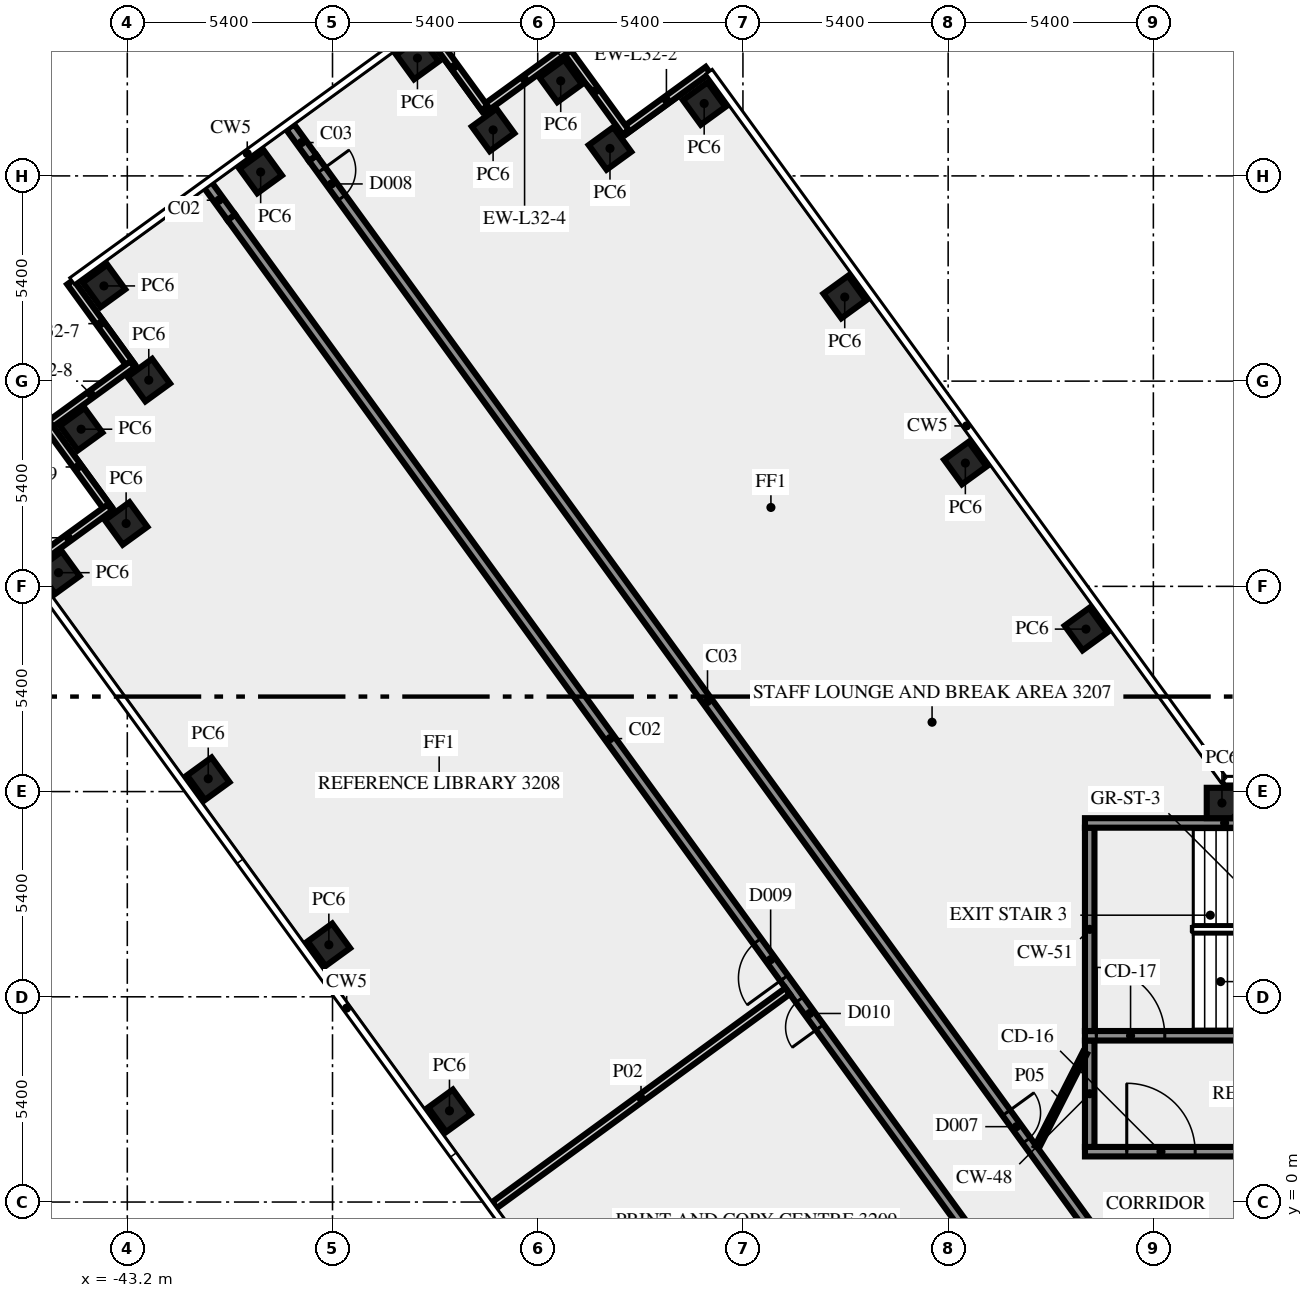
"""IFC4 building model, lengths in metres.
Left out: names, types, materials, properties, quantities, classifications, styles, units other than length and angle.
Written with IfcOpenShell. Run it as: python <this file> out.ifc"""

import sys

from ifc_helpers import new_model, si_unit, direction, frame, frame_2d, origin, origin_2d, place, context, subcontext, project, spatial, rectangle, extrude, element, fill, save


model = new_model("IFC4")
c1 = context("Model", 3, precision=1e-05, world=origin(), true_north=direction((0.0, 1.0)))
c2 = subcontext(c1, "Body", "Model", "MODEL_VIEW")
j1 = project(units=[si_unit("LENGTHUNIT", "METRE"), si_unit("PLANEANGLEUNIT", "RADIAN")], contexts=[c1])
p1 = place(None, origin())
s1 = spatial("IfcSite", under=j1, at=p1, CompositionType="ELEMENT")
p2 = place(p1, origin())
s2 = spatial("IfcBuilding", under=s1, at=p2, CompositionType="ELEMENT")
p3 = place(p2, frame((0.0, 0.0, 139.0)))
s3 = spatial("IfcBuildingStorey", under=s2, at=p3, CompositionType="ELEMENT", Elevation=139.0)
for number, where, z_axis, x_axis in (
    (1, (-17.974, 15.075, 0.0), (0.0, 0.0, 1.0), (-0.588, 0.809, 0.0)),
    (2, (-21.147, 19.444, 0.0), (0.0, 0.0, 1.0), (-0.588, 0.809, 0.0)),
    (3, (-24.321, 23.812, 0.0), (0.0, 0.0, 1.0), (-0.588, 0.809, 0.0)),
    (4, (-28.02, 28.905, 0.0), (0.0, 0.0, 1.0), (-0.809, -0.588, 0.0)),
    (5, (-30.499, 27.723, 0.0), (0.0, 0.0, 1.0), (-0.809, -0.588, 0.0)),
    (6, (-31.795, 29.5, 0.0), (0.0, 0.0, 1.0), (-0.588, 0.809, 0.0)),
    (7, (-33.574, 28.209, 0.0), (0.0, 0.0, 1.0), (-0.588, 0.809, 0.0)),
    (8, (-35.565, 30.1, 0.0), (0.0, 0.0, 1.0), (-0.809, -0.588, 0.0)),
    (9, (-39.691, 27.102, 0.0), (0.0, 0.0, 1.0), (-0.809, -0.588, 0.0)),
    (10, (-43.815, 24.105, 0.0), (0.0, 0.0, 1.0), (-0.809, -0.588, 0.0)),
    (11, (-42.635, 21.626, 0.0), (0.0, 0.0, 1.0), (-0.809, -0.588, 0.0)),
    (12, (-44.415, 20.335, 0.0), (0.0, 0.0, 1.0), (0.588, -0.809, 0.0)),
    (13, (-43.231, 17.854, 0.0), (0.0, 0.0, 1.0), (0.588, -0.809, 0.0)),
    (14, (-45.01, 16.56, 0.0), (0.0, 0.0, 1.0), (0.588, -0.809, 0.0)),
    (15, (-41.07, 11.137, 0.0), (0.0, 0.0, 1.0), (0.588, -0.809, 0.0)),
    (16, (-37.896, 6.769, 0.0), (0.0, 0.0, 1.0), (0.588, -0.809, 0.0)),
    (17, (-34.722, 2.4, 0.0), (0.0, 0.0, 1.0), (0.588, -0.809, 0.0)),
    (18, (-14.395, 10.5, 0.0), (0.0, 0.0, 1.0), (-1.0, 0.0, 0.0)),
):
    element("IfcColumn", number, at=place(p3, frame(where, z_axis=z_axis, x_axis=x_axis)), inside=s3, PredefinedType="COLUMN", context=c2, shape_type="SweptSolid", body=[
        extrude(rectangle(XDim=0.8, YDim=0.8, at=origin_2d()), origin(), (0.0, 0.0, 1.0), 4.65),
    ])
for number, where, z_axis, x_axis in (
    (19, (-27.921, 29.787, 0.0), (0.0, 0.0, 1.0), (-0.809, -0.588, 0.0)),
    (20, (-30.083, 28.149, 0.0), (0.0, 0.0, 1.0), (-0.588, 0.809, 0.0)),
    (21, (-31.654, 30.331, 0.0), (0.0, 0.0, 1.0), (-0.809, -0.588, 0.0)),
    (22, (-33.801, 28.786, 0.0), (0.0, 0.0, 1.0), (-0.588, 0.809, 0.0)),
    (23, (-44.699, 24.205, 0.0), (0.0, 0.0, 1.0), (0.588, -0.809, 0.0)),
    (24, (-43.061, 22.043, 0.0), (0.0, 0.0, 1.0), (-0.809, -0.588, 0.0)),
    (25, (-45.296, 20.434, 0.0), (0.0, 0.0, 1.0), (0.588, -0.809, 0.0)),
    (26, (-43.658, 18.272, 0.0), (0.0, 0.0, 1.0), (-0.809, -0.588, 0.0)),
):
    element("IfcWall", number, at=place(p3, frame(where, z_axis=z_axis, x_axis=x_axis)), inside=s3, PredefinedType="SOLIDWALL", context=c2, shape_type="SweptSolid", body=[
        extrude(rectangle(XDim=2.7, YDim=0.2, at=frame_2d((1.35, 0.0))), origin(), (0.0, 0.0, 1.0), 4.65),
    ])
p4 = place(p3, frame((-18.0, 1.325, 0.0), z_axis=(0.0, 0.0, 1.0), x_axis=(1.0, 0.0, 0.0)))
e27 = element("IfcWall", 27, at=p4, inside=s3, PredefinedType="SHEAR", context=c2, shape_type="SweptSolid", body=[
    extrude(rectangle(XDim=10.5, YDim=0.25, at=frame_2d((5.25, 0.0))), origin(), (0.0, 0.0, 1.0), 4.65),
])
p5 = place(p4, frame((1.1, 0.0, 0.0)))
e28 = element("IfcOpeningElement", 28, at=p5, cuts=e27, PredefinedType="OPENING", context=c2, shape_type="SweptSolid", body=[
    extrude(rectangle(XDim=1.8, YDim=2.1, at=frame_2d((0.9, 1.05))), frame((0.0, 0.135, 0.0), z_axis=(0.0, -1.0, 0.0), x_axis=(1.0, 0.0, 0.0)), (0.0, 0.0, 1.0), 0.27),
])
p6 = place(p3, frame((-17.875, 1.45, 0.0), z_axis=(0.0, 0.0, 1.0), x_axis=(0.0, 1.0, 0.0)))
e29 = element("IfcWall", 29, at=p6, inside=s3, PredefinedType="SHEAR", context=c2, shape_type="SweptSolid", body=[
    extrude(rectangle(XDim=2.8, YDim=0.25, at=frame_2d((1.4, 0.0))), origin(), (0.0, 0.0, 1.0), 4.65),
])
p7 = place(p3, frame((-18.0, 4.375, 0.0), z_axis=(0.0, 0.0, 1.0), x_axis=(1.0, 0.0, 0.0)))
e30 = element("IfcWall", 30, at=p7, inside=s3, PredefinedType="SHEAR", context=c2, shape_type="SweptSolid", body=[
    extrude(rectangle(XDim=10.5, YDim=0.25, at=frame_2d((5.25, 0.0))), origin(), (0.0, 0.0, 1.0), 4.65),
])
p8 = place(p7, frame((0.3, 0.0, 0.0)))
e31 = element("IfcOpeningElement", 31, at=p8, cuts=e30, PredefinedType="OPENING", context=c2, shape_type="SweptSolid", body=[
    extrude(rectangle(XDim=1.8, YDim=2.1, at=frame_2d((0.9, 1.05))), frame((0.0, 0.135, 0.0), z_axis=(0.0, -1.0, 0.0), x_axis=(1.0, 0.0, 0.0)), (0.0, 0.0, 1.0), 0.27),
])
p9 = place(p3, frame((-17.875, 4.5, 0.0), z_axis=(0.0, 0.0, 1.0), x_axis=(0.0, 1.0, 0.0)))
e32 = element("IfcWall", 32, at=p9, inside=s3, PredefinedType="SHEAR", context=c2, shape_type="SweptSolid", body=[
    extrude(rectangle(XDim=5.35, YDim=0.25, at=frame_2d((2.675, 0.0))), origin(), (0.0, 0.0, 1.0), 4.65),
])
p10 = place(p3, frame((-18.0, 9.975, 0.0), z_axis=(0.0, 0.0, 1.0), x_axis=(1.0, 0.0, 0.0)))
e33 = element("IfcWall", 33, at=p10, inside=s3, PredefinedType="SHEAR", context=c2, shape_type="SweptSolid", body=[
    extrude(rectangle(XDim=10.5, YDim=0.25, at=frame_2d((5.25, 0.0))), origin(), (0.0, 0.0, 1.0), 4.65),
])
p11 = place(p10, frame((4.5, 0.0, 1.0)))
e34 = element("IfcOpeningElement", 34, at=p11, cuts=e33, PredefinedType="OPENING", context=c2, shape_type="SweptSolid", body=[
    extrude(rectangle(XDim=1.2, YDim=1.2, at=frame_2d((0.6, 0.6))), frame((0.0, 0.135, 0.0), z_axis=(0.0, -1.0, 0.0), x_axis=(1.0, 0.0, 0.0)), (0.0, 0.0, 1.0), 0.27),
])
p12 = place(p3, frame((-20.531, -1.523, 0.0), z_axis=(0.0, 0.0, 1.0), x_axis=(-0.587781654618, 0.809019608226, 0.0)))
e35 = element("IfcWall", 35, at=p12, inside=s3, PredefinedType="SOLIDWALL", context=c2, shape_type="SweptSolid", body=[
    extrude(rectangle(XDim=33.911, YDim=0.25, at=frame_2d((16.956, 0.0))), origin(), (0.0, 0.0, 1.0), 4.65),
])
p13 = place(p12, frame((9.166, 0.0, 0.0)))
e36 = element("IfcOpeningElement", 36, at=p13, cuts=e35, PredefinedType="OPENING", context=c2, shape_type="SweptSolid", body=[
    extrude(rectangle(XDim=1.2, YDim=2.1, at=frame_2d((0.6, 1.05))), frame((0.0, 0.135, 0.0), z_axis=(0.0, -1.0, 0.0), x_axis=(1.0, 0.0, 0.0)), (0.0, 0.0, 1.0), 0.27),
])
p14 = place(p12, frame((7.566, 0.0, 0.0)))
e37 = element("IfcOpeningElement", 37, at=p14, cuts=e35, PredefinedType="OPENING", context=c2, shape_type="SweptSolid", body=[
    extrude(rectangle(XDim=0.9, YDim=2.1, at=frame_2d((0.45, 1.05))), frame((0.0, 0.135, 0.0), z_axis=(0.0, -1.0, 0.0), x_axis=(1.0, 0.0, 0.0)), (0.0, 0.0, 1.0), 0.27),
])
p15 = place(p3, frame((-38.32, 27.469, 0.0), z_axis=(0.0, 0.0, 1.0), x_axis=(0.587788021768, -0.809014982226, 0.0)))
e38 = element("IfcWall", 38, at=p15, inside=s3, PredefinedType="SOLIDWALL", context=c2, shape_type="SweptSolid", body=[
    extrude(rectangle(XDim=35.344, YDim=0.25, at=frame_2d((17.672, 0.0))), origin(), (0.0, 0.0, 1.0), 4.65),
])
p16 = place(p15, frame((31.052, 0.0, 0.0)))
e39 = element("IfcOpeningElement", 39, at=p16, cuts=e38, PredefinedType="OPENING", context=c2, shape_type="SweptSolid", body=[
    extrude(rectangle(XDim=0.9, YDim=2.1, at=frame_2d((0.45, 1.05))), frame((0.0, 0.135, 0.0), z_axis=(0.0, -1.0, 0.0), x_axis=(1.0, 0.0, 0.0)), (0.0, 0.0, 1.0), 0.27),
])
p17 = place(p15, frame((0.392, 0.0, 0.0)))
e40 = element("IfcOpeningElement", 40, at=p17, cuts=e38, PredefinedType="OPENING", context=c2, shape_type="SweptSolid", body=[
    extrude(rectangle(XDim=0.9, YDim=2.1, at=frame_2d((0.45, 1.05))), frame((0.0, 0.135, 0.0), z_axis=(0.0, -1.0, 0.0), x_axis=(1.0, 0.0, 0.0)), (0.0, 0.0, 1.0), 0.27),
])
p18 = place(p3, frame((-33.538, -0.081, 0.0), z_axis=(0.0, 0.0, 1.0), x_axis=(0.80759810708, 0.589733242612, 0.0)))
e41 = element("IfcWall", 41, at=p18, inside=s3, PredefinedType="SOLIDWALL", context=c2, shape_type="SweptSolid", body=[
    extrude(rectangle(XDim=9.55, YDim=0.2, at=frame_2d((4.775, 0.0))), origin(), (0.0, 0.0, 1.0), 3.85),
])
p19 = place(p3, frame((-19.261, 1.45, 0.0), z_axis=(0.0, 0.0, 1.0), x_axis=(0.453950796792, 0.891026752736, 0.0)))
e42 = element("IfcWall", 42, at=p19, inside=s3, PredefinedType="PARTITIONING", context=c2, shape_type="SweptSolid", body=[
    extrude(rectangle(XDim=2.778, YDim=0.12, at=frame_2d((1.389, 0.0))), origin(), (0.0, 0.0, 1.0), 4.65),
])
p20 = place(p3, frame((-40.463, 25.911, 0.0), z_axis=(0.0, 0.0, 1.0), x_axis=(-0.587792454268, 0.809011761785, 0.0)))
e43 = element("IfcWall", 43, at=p20, inside=s3, PredefinedType="SOLIDWALL", context=c2, shape_type="SweptSolid", body=[
    extrude(rectangle(XDim=1.11, YDim=0.25, at=frame_2d((0.555, 0.0))), origin(), (0.0, 0.0, 1.0), 3.85),
])
p21 = place(p3, frame((-38.32, 27.469, 0.0), z_axis=(0.0, 0.0, 1.0), x_axis=(-0.587811913486, 0.808997623213, 0.0)))
e44 = element("IfcWall", 44, at=p21, inside=s3, PredefinedType="SOLIDWALL", context=c2, shape_type="SweptSolid", body=[
    extrude(rectangle(XDim=1.009, YDim=0.25, at=frame_2d((0.504, 0.0))), origin(), (0.0, 0.0, 1.0), 3.85),
])
p22 = place(p5, origin())
e45 = element("IfcDoor", 45, at=p22, inside=s3, OperationType="DOUBLE_DOOR_SINGLE_SWING", PredefinedType="DOOR", context=c2, shape_type="SweptSolid", body=[
    extrude(rectangle(XDim=1.8, YDim=2.1, at=frame_2d((0.9, 1.05))), frame((0.0, 0.025, 0.0), z_axis=(0.0, -1.0, 0.0), x_axis=(1.0, 0.0, 0.0)), (0.0, 0.0, 1.0), 0.05),
])
fill(e28, e45)
p23 = place(p8, origin())
e46 = element("IfcDoor", 46, at=p23, inside=s3, OperationType="DOUBLE_DOOR_SINGLE_SWING", PredefinedType="DOOR", context=c2, shape_type="SweptSolid", body=[
    extrude(rectangle(XDim=1.8, YDim=2.1, at=frame_2d((0.9, 1.05))), frame((0.0, 0.025, 0.0), z_axis=(0.0, -1.0, 0.0), x_axis=(1.0, 0.0, 0.0)), (0.0, 0.0, 1.0), 0.05),
])
fill(e31, e46)
p24 = place(p13, origin())
e47 = element("IfcDoor", 47, at=p24, inside=s3, OperationType="SINGLE_SWING_LEFT", PredefinedType="DOOR", context=c2, shape_type="SweptSolid", body=[
    extrude(rectangle(XDim=1.2, YDim=2.1, at=frame_2d((0.6, 1.05))), frame((0.0, 0.025, 0.0), z_axis=(0.0, -1.0, 0.0), x_axis=(1.0, 0.0, 0.0)), (0.0, 0.0, 1.0), 0.05),
])
fill(e36, e47)
p25 = place(p16, origin())
e48 = element("IfcDoor", 48, at=p25, inside=s3, OperationType="SINGLE_SWING_RIGHT", PredefinedType="DOOR", context=c2, shape_type="SweptSolid", body=[
    extrude(rectangle(XDim=0.9, YDim=2.1, at=frame_2d((0.45, 1.05))), frame((0.0, 0.025, 0.0), z_axis=(0.0, -1.0, 0.0), x_axis=(1.0, 0.0, 0.0)), (0.0, 0.0, 1.0), 0.05),
])
fill(e39, e48)
p26 = place(p17, origin())
e49 = element("IfcDoor", 49, at=p26, inside=s3, OperationType="SINGLE_SWING_LEFT", PredefinedType="DOOR", context=c2, shape_type="SweptSolid", body=[
    extrude(rectangle(XDim=0.9, YDim=2.1, at=frame_2d((0.45, 1.05))), frame((0.0, 0.025, 0.0), z_axis=(0.0, -1.0, 0.0), x_axis=(1.0, 0.0, 0.0)), (0.0, 0.0, 1.0), 0.05),
])
fill(e40, e49)
p27 = place(p14, origin())
e50 = element("IfcDoor", 50, at=p27, inside=s3, OperationType="SINGLE_SWING_RIGHT", PredefinedType="DOOR", context=c2, shape_type="SweptSolid", body=[
    extrude(rectangle(XDim=0.9, YDim=2.1, at=frame_2d((0.45, 1.05))), frame((0.0, 0.025, 0.0), z_axis=(0.0, -1.0, 0.0), x_axis=(1.0, 0.0, 0.0)), (0.0, 0.0, 1.0), 0.05),
])
fill(e37, e50)
save(model, sys.argv[1])
